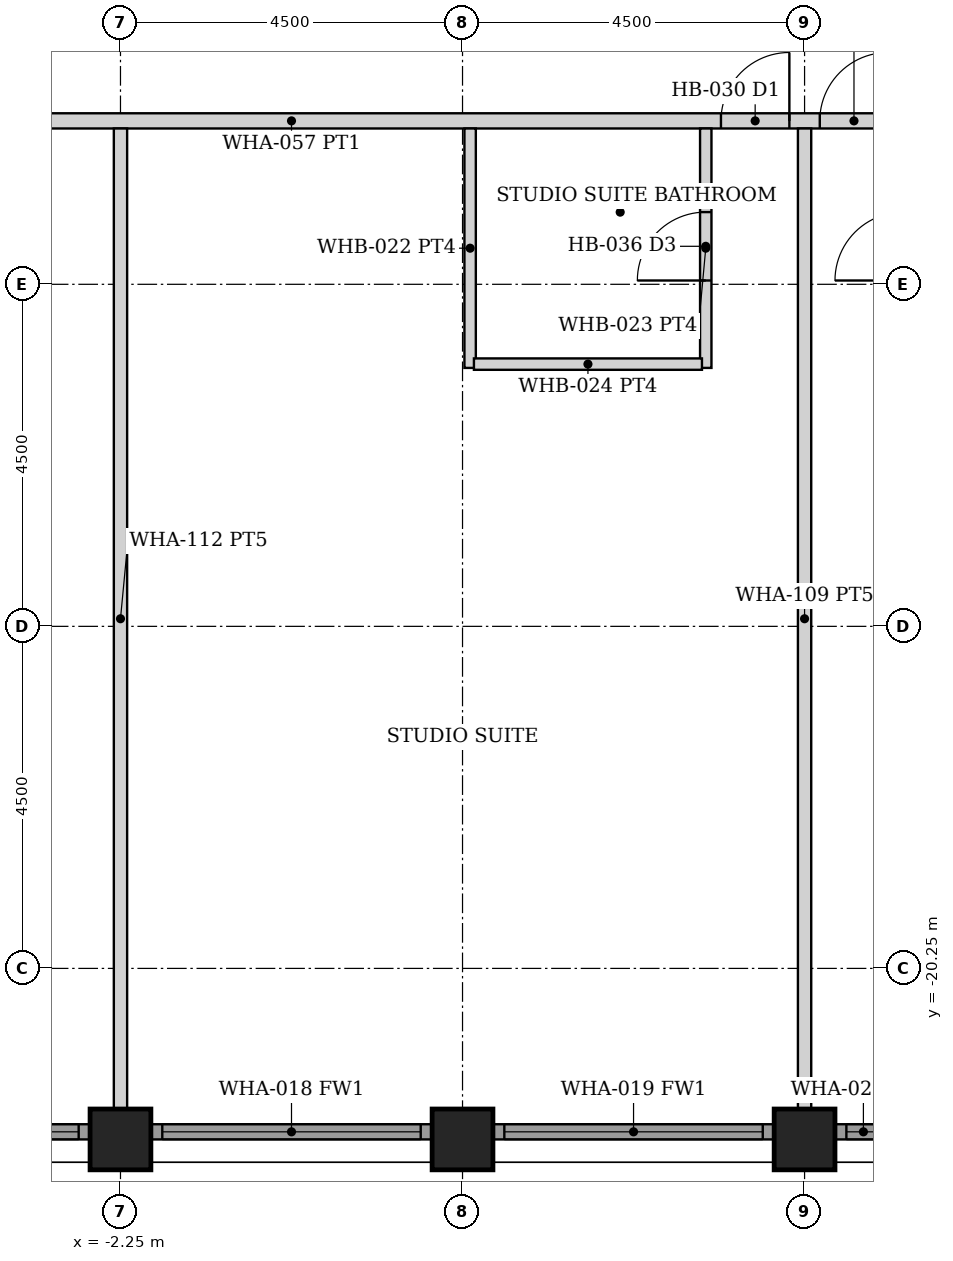
"""IFC4 building model, lengths in metres.
Left out: names, types, materials, properties, quantities, classifications, styles, units other than length and angle.
Written with IfcOpenShell. Run it as: python <this file> out.ifc"""

import sys

from ifc_helpers import new_model, si_unit, direction, frame, frame_2d, origin, origin_2d, place, context, subcontext, project, spatial, rectangle, hollow_rectangle, extrude, element, fill, save


model = new_model("IFC4")
c1 = context("Model", 3, precision=1e-05, world=origin(), true_north=direction((0.0, 1.0)))
c2 = subcontext(c1, "Body", "Model", "MODEL_VIEW")
j1 = project(units=[si_unit("LENGTHUNIT", "METRE"), si_unit("PLANEANGLEUNIT", "RADIAN")], contexts=[c1])
p1 = place(None, origin())
s1 = spatial("IfcSite", under=j1, at=p1, CompositionType="ELEMENT")
p2 = place(p1, origin())
s2 = spatial("IfcBuilding", under=s1, at=p2, CompositionType="ELEMENT")
p3 = place(p2, frame((0.0, 0.0, 129.2)))
s3 = spatial("IfcBuildingStorey", under=s2, at=p3, CompositionType="ELEMENT", Elevation=129.2)
for number, where, z_axis, x_axis in (
    (1, (-2.25, -22.5, 0.0), (0.0, 0.0, 1.0), (0.0, 1.0, 0.0)),
    (2, (2.25, -22.5, 0.0), (0.0, 0.0, 1.0), (0.0, 1.0, 0.0)),
    (3, (6.75, -22.5, 0.0), (0.0, 0.0, 1.0), (0.0, 1.0, 0.0)),
):
    element("IfcColumn", number, at=place(p3, frame(where, z_axis=z_axis, x_axis=x_axis)), inside=s3, PredefinedType="COLUMN", context=c2, shape_type="SweptSolid", body=[
        extrude(hollow_rectangle(XDim=0.8, YDim=0.8, WallThickness=0.06, at=origin_2d()), origin(), (0.0, 0.0, 1.0), 3.6),
    ])
p4 = place(p3, frame((-6.345, -22.4, 0.0), z_axis=(0.0, 0.0, 1.0), x_axis=(1.0, 0.0, 0.0)))
e4 = element("IfcWall", 4, at=p4, inside=s3, PredefinedType="SOLIDWALL", context=c2, shape_type="SweptSolid", body=[
    extrude(rectangle(XDim=3.69, YDim=0.2, at=frame_2d((1.845, 0.0))), origin(), (0.0, 0.0, 1.0), 2.479),
])
p5 = place(p4, frame((0.145, 0.0, 0.3)))
e5 = element("IfcOpeningElement", 5, at=p5, cuts=e4, PredefinedType="OPENING", context=c2, shape_type="SweptSolid", body=[
    extrude(rectangle(XDim=3.4, YDim=2.029, at=frame_2d((1.7, 1.015))), frame((0.0, 0.11, 0.0), z_axis=(0.0, -1.0, 0.0), x_axis=(1.0, 0.0, 0.0)), (0.0, 0.0, 1.0), 0.22),
])
p6 = place(p3, frame((-1.845, -22.4, 0.0), z_axis=(0.0, 0.0, 1.0), x_axis=(1.0, 0.0, 0.0)))
e6 = element("IfcWall", 6, at=p6, inside=s3, PredefinedType="SOLIDWALL", context=c2, shape_type="SweptSolid", body=[
    extrude(rectangle(XDim=3.69, YDim=0.2, at=frame_2d((1.845, 0.0))), origin(), (0.0, 0.0, 1.0), 2.479),
])
p7 = place(p6, frame((0.145, 0.0, 0.3)))
e7 = element("IfcOpeningElement", 7, at=p7, cuts=e6, PredefinedType="OPENING", context=c2, shape_type="SweptSolid", body=[
    extrude(rectangle(XDim=3.4, YDim=2.029, at=frame_2d((1.7, 1.015))), frame((0.0, 0.11, 0.0), z_axis=(0.0, -1.0, 0.0), x_axis=(1.0, 0.0, 0.0)), (0.0, 0.0, 1.0), 0.22),
])
p8 = place(p3, frame((2.655, -22.4, 0.0), z_axis=(0.0, 0.0, 1.0), x_axis=(1.0, 0.0, 0.0)))
e8 = element("IfcWall", 8, at=p8, inside=s3, PredefinedType="SOLIDWALL", context=c2, shape_type="SweptSolid", body=[
    extrude(rectangle(XDim=3.69, YDim=0.2, at=frame_2d((1.845, 0.0))), origin(), (0.0, 0.0, 1.0), 2.479),
])
p9 = place(p8, frame((0.145, 0.0, 0.3)))
e9 = element("IfcOpeningElement", 9, at=p9, cuts=e8, PredefinedType="OPENING", context=c2, shape_type="SweptSolid", body=[
    extrude(rectangle(XDim=3.4, YDim=2.029, at=frame_2d((1.7, 1.015))), frame((0.0, 0.11, 0.0), z_axis=(0.0, -1.0, 0.0), x_axis=(1.0, 0.0, 0.0)), (0.0, 0.0, 1.0), 0.22),
])
p10 = place(p3, frame((7.155, -22.4, 0.0), z_axis=(0.0, 0.0, 1.0), x_axis=(1.0, 0.0, 0.0)))
e10 = element("IfcWall", 10, at=p10, inside=s3, PredefinedType="SOLIDWALL", context=c2, shape_type="SweptSolid", body=[
    extrude(rectangle(XDim=3.69, YDim=0.2, at=frame_2d((1.845, 0.0))), origin(), (0.0, 0.0, 1.0), 2.479),
])
p11 = place(p10, frame((0.145, 0.0, 0.3)))
e11 = element("IfcOpeningElement", 11, at=p11, cuts=e10, PredefinedType="OPENING", context=c2, shape_type="SweptSolid", body=[
    extrude(rectangle(XDim=3.4, YDim=2.029, at=frame_2d((1.7, 1.015))), frame((0.0, 0.11, 0.0), z_axis=(0.0, -1.0, 0.0), x_axis=(1.0, 0.0, 0.0)), (0.0, 0.0, 1.0), 0.22),
])
p12 = place(p3, frame((-22.3, -9.1, 0.0), z_axis=(0.0, 0.0, 1.0), x_axis=(1.0, 0.0, 0.0)))
e12 = element("IfcWall", 12, at=p12, inside=s3, PredefinedType="PARTITIONING", context=c2, shape_type="SweptSolid", body=[
    extrude(rectangle(XDim=44.6, YDim=0.2, at=frame_2d((22.3, 0.0))), origin(), (0.0, 0.0, 1.0), 2.473),
])
p13 = place(p12, frame((9.95, 0.0, 0.0)))
e13 = element("IfcOpeningElement", 13, at=p13, cuts=e12, PredefinedType="OPENING", context=c2, shape_type="SweptSolid", body=[
    extrude(rectangle(XDim=0.9, YDim=2.1, at=frame_2d((0.45, 1.05))), frame((0.0, 0.11, 0.0), z_axis=(0.0, -1.0, 0.0), x_axis=(1.0, 0.0, 0.0)), (0.0, 0.0, 1.0), 0.22),
])
p14 = place(p12, frame((11.25, 0.0, 0.0)))
e14 = element("IfcOpeningElement", 14, at=p14, cuts=e12, PredefinedType="OPENING", context=c2, shape_type="SweptSolid", body=[
    extrude(rectangle(XDim=0.9, YDim=2.1, at=frame_2d((0.45, 1.05))), frame((0.0, 0.11, 0.0), z_axis=(0.0, -1.0, 0.0), x_axis=(1.0, 0.0, 0.0)), (0.0, 0.0, 1.0), 0.22),
])
p15 = place(p12, frame((27.95, 0.0, 0.0)))
e15 = element("IfcOpeningElement", 15, at=p15, cuts=e12, PredefinedType="OPENING", context=c2, shape_type="SweptSolid", body=[
    extrude(rectangle(XDim=0.9, YDim=2.1, at=frame_2d((0.45, 1.05))), frame((0.0, 0.11, 0.0), z_axis=(0.0, -1.0, 0.0), x_axis=(1.0, 0.0, 0.0)), (0.0, 0.0, 1.0), 0.22),
])
p16 = place(p12, frame((29.25, 0.0, 0.0)))
e16 = element("IfcOpeningElement", 16, at=p16, cuts=e12, PredefinedType="OPENING", context=c2, shape_type="SweptSolid", body=[
    extrude(rectangle(XDim=0.9, YDim=2.1, at=frame_2d((0.45, 1.05))), frame((0.0, 0.11, 0.0), z_axis=(0.0, -1.0, 0.0), x_axis=(1.0, 0.0, 0.0)), (0.0, 0.0, 1.0), 0.22),
])
p17 = place(p12, frame((36.95, 0.0, 0.0)))
e17 = element("IfcOpeningElement", 17, at=p17, cuts=e12, PredefinedType="OPENING", context=c2, shape_type="SweptSolid", body=[
    extrude(rectangle(XDim=0.9, YDim=2.1, at=frame_2d((0.45, 1.05))), frame((0.0, 0.11, 0.0), z_axis=(0.0, -1.0, 0.0), x_axis=(1.0, 0.0, 0.0)), (0.0, 0.0, 1.0), 0.22),
])
p18 = place(p12, frame((38.85, 0.0, 0.0)))
e18 = element("IfcOpeningElement", 18, at=p18, cuts=e12, PredefinedType="OPENING", context=c2, shape_type="SweptSolid", body=[
    extrude(rectangle(XDim=0.9, YDim=2.1, at=frame_2d((0.45, 1.05))), frame((0.0, 0.11, 0.0), z_axis=(0.0, -1.0, 0.0), x_axis=(1.0, 0.0, 0.0)), (0.0, 0.0, 1.0), 0.22),
])
p19 = place(p12, frame((4.85, 0.0, 0.0)))
e19 = element("IfcOpeningElement", 19, at=p19, cuts=e12, PredefinedType="OPENING", context=c2, shape_type="SweptSolid", body=[
    extrude(rectangle(XDim=0.9, YDim=2.1, at=frame_2d((0.45, 1.05))), frame((0.0, 0.11, 0.0), z_axis=(0.0, -1.0, 0.0), x_axis=(1.0, 0.0, 0.0)), (0.0, 0.0, 1.0), 0.22),
])
p20 = place(p3, frame((5.45, -12.35, 0.0), z_axis=(0.0, 0.0, 1.0), x_axis=(0.0, 1.0, 0.0)))
e20 = element("IfcWall", 20, at=p20, inside=s3, PredefinedType="PARTITIONING", context=c2, shape_type="SweptSolid", body=[
    extrude(rectangle(XDim=3.15, YDim=0.15, at=frame_2d((1.575, 0.0))), origin(), (0.0, 0.0, 1.0), 2.473),
])
p21 = place(p20, frame((1.15, 0.0, 0.0)))
e21 = element("IfcOpeningElement", 21, at=p21, cuts=e20, PredefinedType="OPENING", context=c2, shape_type="SweptSolid", body=[
    extrude(rectangle(XDim=0.9, YDim=2.1, at=frame_2d((0.45, 1.05))), frame((0.0, 0.085, 0.0), z_axis=(0.0, -1.0, 0.0), x_axis=(1.0, 0.0, 0.0)), (0.0, 0.0, 1.0), 0.17),
])
p22 = place(p3, frame((2.35, -12.35, 0.0), z_axis=(0.0, 0.0, 1.0), x_axis=(0.0, 1.0, 0.0)))
e22 = element("IfcWall", 22, at=p22, inside=s3, PredefinedType="PARTITIONING", context=c2, shape_type="SweptSolid", body=[
    extrude(rectangle(XDim=3.15, YDim=0.15, at=frame_2d((1.575, 0.0))), origin(), (0.0, 0.0, 1.0), 2.473),
])
p23 = place(p3, frame((2.4, -12.3, 0.0), z_axis=(0.0, 0.0, 1.0), x_axis=(1.0, 0.0, 0.0)))
e23 = element("IfcWall", 23, at=p23, inside=s3, PredefinedType="PARTITIONING", context=c2, shape_type="SweptSolid", body=[
    extrude(rectangle(XDim=3.0, YDim=0.15, at=frame_2d((1.5, 0.0))), origin(), (0.0, 0.0, 1.0), 2.473),
])
for number, where, z_axis, x_axis in (
    (24, (-2.25, -22.1, 0.0), (0.0, 0.0, 1.0), (0.0, 1.0, 0.0)),
    (25, (6.75, -22.1, 0.0), (0.0, 0.0, 1.0), (0.0, 1.0, 0.0)),
):
    element("IfcWall", number, at=place(p3, frame(where, z_axis=z_axis, x_axis=x_axis)), inside=s3, PredefinedType="PARTITIONING", context=c2, shape_type="SweptSolid", body=[
        extrude(rectangle(XDim=12.9, YDim=0.175, at=frame_2d((6.45, 0.0))), origin(), (0.0, 0.0, 1.0), 2.473),
    ])
p24 = place(p5, origin())
e26 = element("IfcWindow", 26, at=p24, inside=s3, PartitioningType="SINGLE_PANEL", PredefinedType="WINDOW", context=c2, shape_type="SweptSolid", body=[
    extrude(rectangle(XDim=3.4, YDim=2.029, at=frame_2d((1.7, 1.015))), frame((0.0, 0.03, 0.0), z_axis=(0.0, -1.0, 0.0), x_axis=(1.0, 0.0, 0.0)), (0.0, 0.0, 1.0), 0.06),
])
fill(e5, e26)
p25 = place(p7, origin())
e27 = element("IfcWindow", 27, at=p25, inside=s3, PartitioningType="SINGLE_PANEL", PredefinedType="WINDOW", context=c2, shape_type="SweptSolid", body=[
    extrude(rectangle(XDim=3.4, YDim=2.029, at=frame_2d((1.7, 1.015))), frame((0.0, 0.03, 0.0), z_axis=(0.0, -1.0, 0.0), x_axis=(1.0, 0.0, 0.0)), (0.0, 0.0, 1.0), 0.06),
])
fill(e7, e27)
p26 = place(p9, origin())
e28 = element("IfcWindow", 28, at=p26, inside=s3, PartitioningType="SINGLE_PANEL", PredefinedType="WINDOW", context=c2, shape_type="SweptSolid", body=[
    extrude(rectangle(XDim=3.4, YDim=2.029, at=frame_2d((1.7, 1.015))), frame((0.0, 0.03, 0.0), z_axis=(0.0, -1.0, 0.0), x_axis=(1.0, 0.0, 0.0)), (0.0, 0.0, 1.0), 0.06),
])
fill(e9, e28)
p27 = place(p11, origin())
e29 = element("IfcWindow", 29, at=p27, inside=s3, PartitioningType="SINGLE_PANEL", PredefinedType="WINDOW", context=c2, shape_type="SweptSolid", body=[
    extrude(rectangle(XDim=3.4, YDim=2.029, at=frame_2d((1.7, 1.015))), frame((0.0, 0.03, 0.0), z_axis=(0.0, -1.0, 0.0), x_axis=(1.0, 0.0, 0.0)), (0.0, 0.0, 1.0), 0.06),
])
fill(e11, e29)
p28 = place(p15, origin())
e30 = element("IfcDoor", 30, at=p28, inside=s3, OperationType="SINGLE_SWING_RIGHT", PredefinedType="DOOR", context=c2, shape_type="SweptSolid", body=[
    extrude(rectangle(XDim=0.9, YDim=2.1, at=frame_2d((0.45, 1.05))), frame((0.0, 0.025, 0.0), z_axis=(0.0, -1.0, 0.0), x_axis=(1.0, 0.0, 0.0)), (0.0, 0.0, 1.0), 0.05),
])
fill(e15, e30)
p29 = place(p21, origin())
e31 = element("IfcDoor", 31, at=p29, inside=s3, OperationType="SINGLE_SWING_LEFT", PredefinedType="DOOR", context=c2, shape_type="SweptSolid", body=[
    extrude(rectangle(XDim=0.9, YDim=2.1, at=frame_2d((0.45, 1.05))), frame((0.0, 0.025, 0.0), z_axis=(0.0, -1.0, 0.0), x_axis=(1.0, 0.0, 0.0)), (0.0, 0.0, 1.0), 0.05),
])
fill(e21, e31)
p30 = place(p16, origin())
e32 = element("IfcDoor", 32, at=p30, inside=s3, OperationType="SINGLE_SWING_RIGHT", PredefinedType="DOOR", context=c2, shape_type="SweptSolid", body=[
    extrude(rectangle(XDim=0.9, YDim=2.1, at=frame_2d((0.45, 1.05))), frame((0.0, 0.025, 0.0), z_axis=(0.0, -1.0, 0.0), x_axis=(1.0, 0.0, 0.0)), (0.0, 0.0, 1.0), 0.05),
])
fill(e16, e32)
save(model, sys.argv[1])
